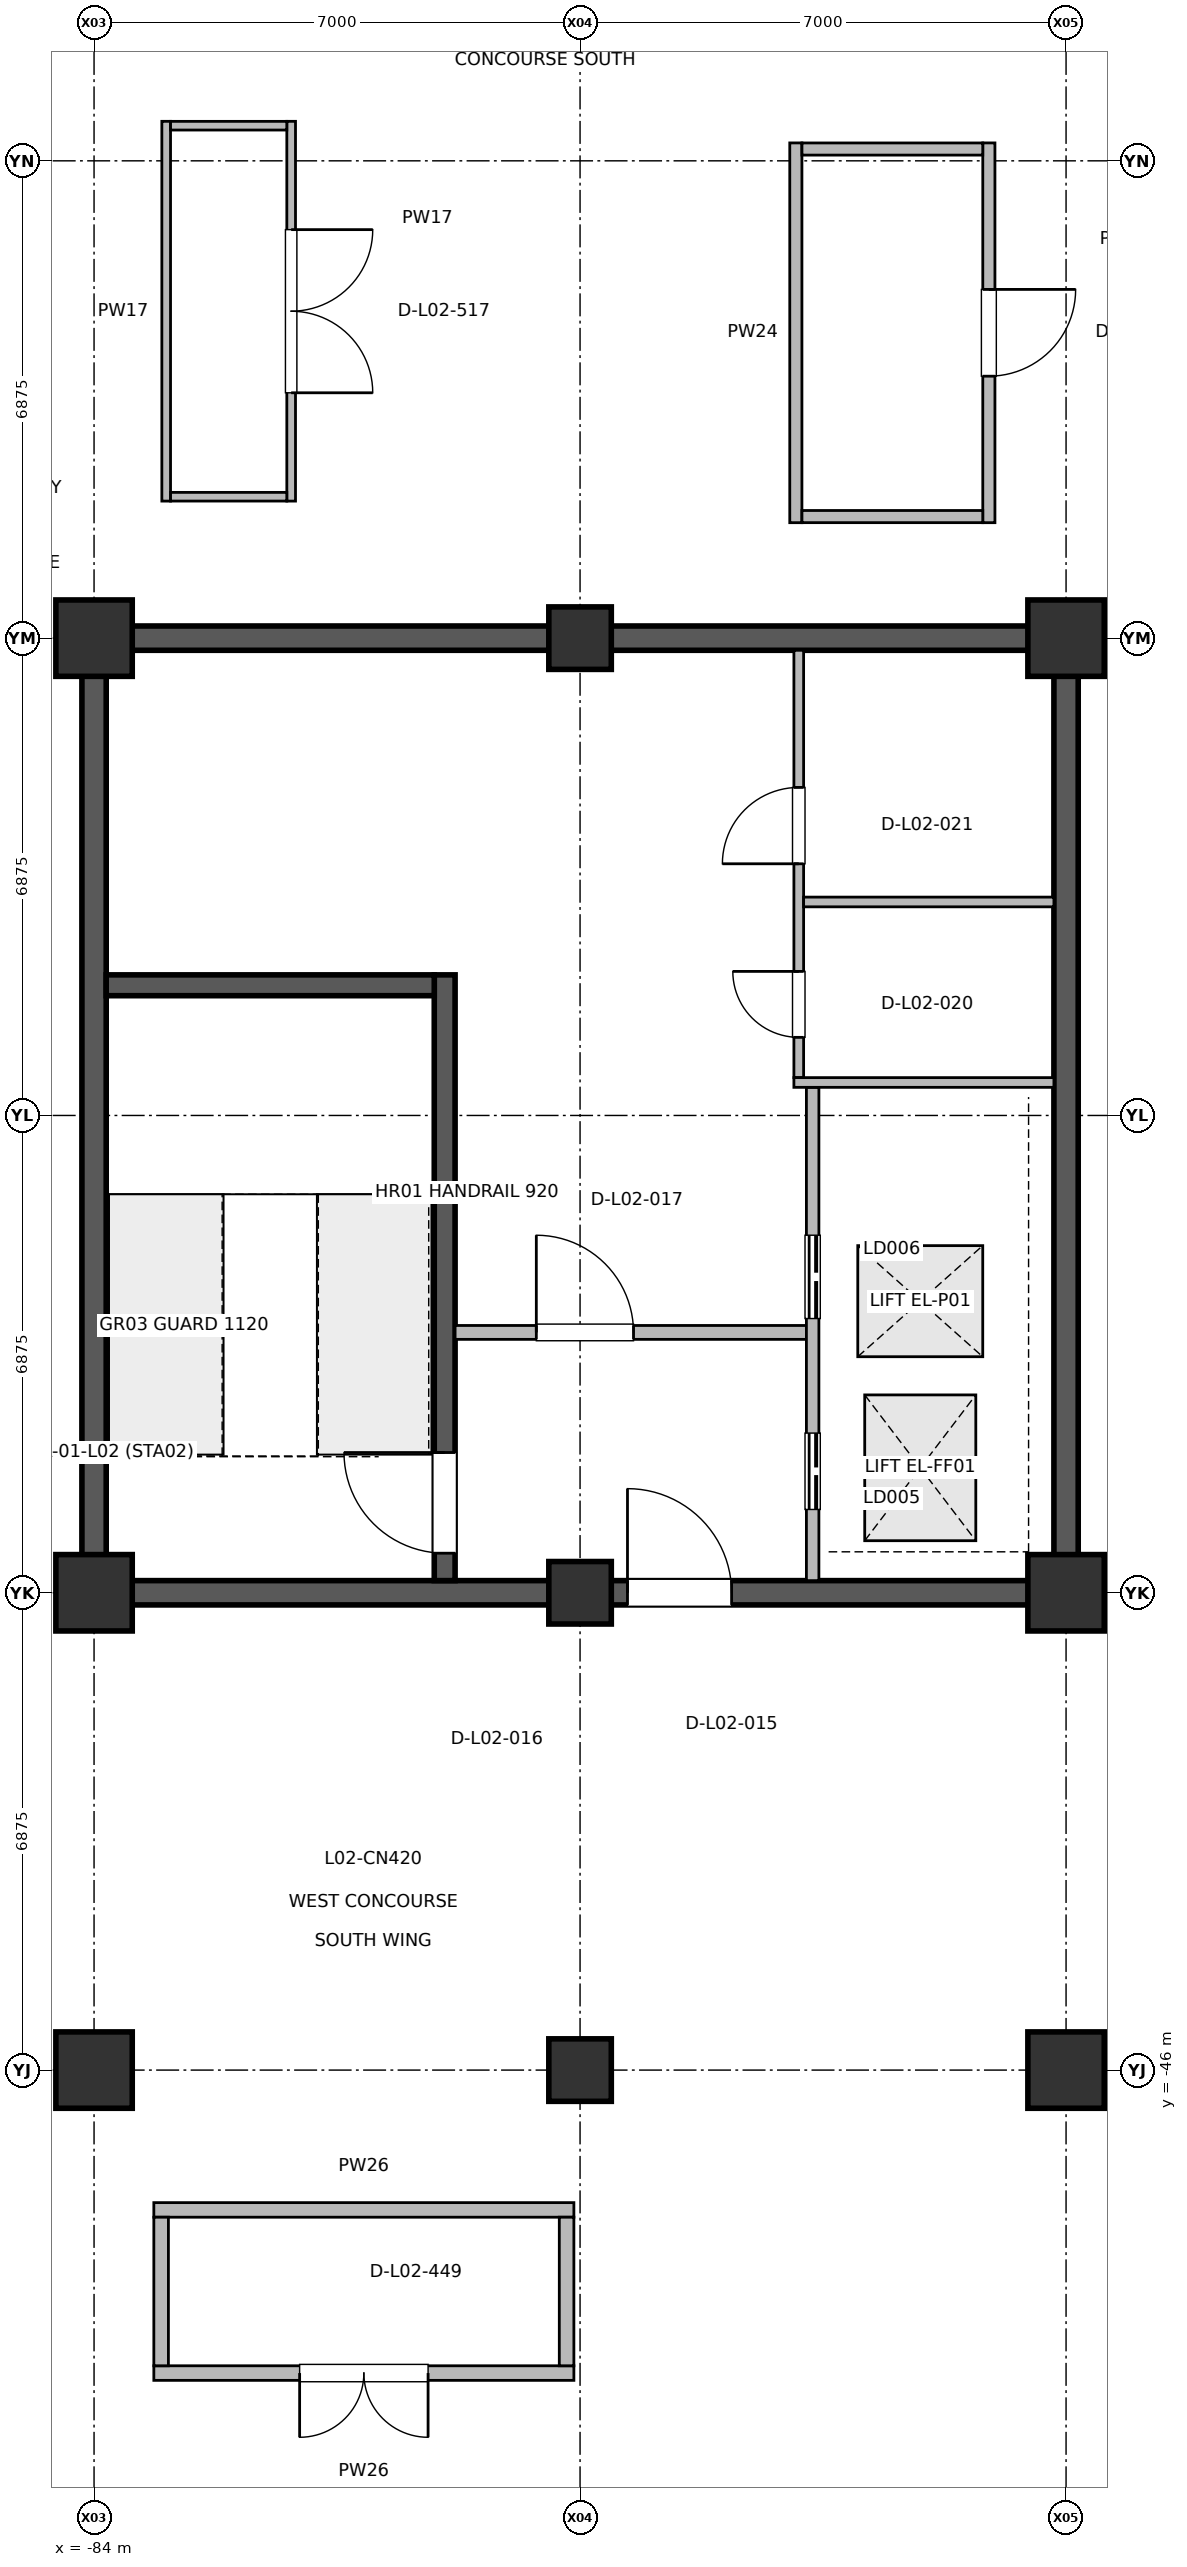
"""IFC4 building model, lengths in metres.
Left out: names, types, materials, properties, quantities, classifications, styles, units other than length and angle.
Written with IfcOpenShell. Run it as: python <this file> out.ifc"""

import sys

from ifc_helpers import new_model, si_unit, direction, frame, frame_2d, origin, origin_2d, place, context, subcontext, project, spatial, rectangle, extrude, element, fill, save


model = new_model("IFC4")
c1 = context("Model", 3, precision=1e-05, world=origin(), true_north=direction((0.0, 1.0)))
c2 = subcontext(c1, "Body", "Model", "MODEL_VIEW")
j1 = project(units=[si_unit("LENGTHUNIT", "METRE"), si_unit("PLANEANGLEUNIT", "RADIAN")], contexts=[c1])
p1 = place(None, origin())
s1 = spatial("IfcSite", under=j1, at=p1, CompositionType="ELEMENT")
p2 = place(p1, origin())
s2 = spatial("IfcBuilding", under=s1, at=p2, CompositionType="ELEMENT")
p3 = place(p2, frame((0.0, 0.0, 6.0)))
s3 = spatial("IfcBuildingStorey", under=s2, at=p3, CompositionType="ELEMENT", Elevation=6.0)
for number, where, z_axis, x_axis in (
    (1, (-84.0, -46.0, 0.0), (0.0, 0.0, 1.0), (1.0, 0.0, 0.0)),
    (2, (-84.0, -39.125, 0.0), (0.0, 0.0, 1.0), (1.0, 0.0, 0.0)),
    (3, (-84.0, -25.375, 0.0), (0.0, 0.0, 1.0), (1.0, 0.0, 0.0)),
):
    element("IfcColumn", number, at=place(p3, frame(where, z_axis=z_axis, x_axis=x_axis)), inside=s3, PredefinedType="COLUMN", context=c2, shape_type="SweptSolid", body=[
        extrude(rectangle(XDim=1.1, YDim=1.1, at=origin_2d()), origin(), (0.0, 0.0, 1.0), 5.398),
    ])
for number, where, z_axis, x_axis in (
    (4, (-77.0, -46.0, 0.0), (0.0, 0.0, 1.0), (1.0, 0.0, 0.0)),
    (5, (-77.0, -39.125, 0.0), (0.0, 0.0, 1.0), (1.0, 0.0, 0.0)),
    (6, (-77.0, -25.375, 0.0), (0.0, 0.0, 1.0), (1.0, 0.0, 0.0)),
):
    element("IfcColumn", number, at=place(p3, frame(where, z_axis=z_axis, x_axis=x_axis)), inside=s3, PredefinedType="COLUMN", context=c2, shape_type="SweptSolid", body=[
        extrude(rectangle(XDim=0.9, YDim=0.9, at=origin_2d()), origin(), (0.0, 0.0, 1.0), 5.398),
    ])
for number, where, z_axis, x_axis in (
    (7, (-70.0, -46.0, 0.0), (0.0, 0.0, 1.0), (1.0, 0.0, 0.0)),
    (8, (-70.0, -39.125, 0.0), (0.0, 0.0, 1.0), (1.0, 0.0, 0.0)),
    (9, (-70.0, -25.375, 0.0), (0.0, 0.0, 1.0), (1.0, 0.0, 0.0)),
):
    element("IfcColumn", number, at=place(p3, frame(where, z_axis=z_axis, x_axis=x_axis)), inside=s3, PredefinedType="COLUMN", context=c2, shape_type="SweptSolid", body=[
        extrude(rectangle(XDim=1.1, YDim=1.1, at=origin_2d()), origin(), (0.0, 0.0, 1.0), 5.398),
    ])
for number, where, z_axis, x_axis in (
    (10, (-84.0, -38.95, 0.0), (0.0, 0.0, 1.0), (0.0, 1.0, 0.0)),
    (11, (-70.0, -38.95, 0.0), (0.0, 0.0, 1.0), (0.0, 1.0, 0.0)),
):
    element("IfcWall", number, at=place(p3, frame(where, z_axis=z_axis, x_axis=x_axis)), inside=s3, PredefinedType="SHEAR", context=c2, shape_type="SweptSolid", body=[
        extrude(rectangle(XDim=13.4, YDim=0.35, at=frame_2d((6.7, 0.0))), origin(), (0.0, 0.0, 1.0), 5.2),
    ])
p4 = place(p3, frame((-83.825, -39.125, 0.0), z_axis=(0.0, 0.0, 1.0), x_axis=(1.0, 0.0, 0.0)))
e12 = element("IfcWall", 12, at=p4, inside=s3, PredefinedType="SHEAR", context=c2, shape_type="SweptSolid", body=[
    extrude(rectangle(XDim=13.65, YDim=0.35, at=frame_2d((6.825, 0.0))), origin(), (0.0, 0.0, 1.0), 5.2),
])
p5 = place(p4, frame((7.508, 0.0, 0.0)))
e13 = element("IfcOpeningElement", 13, at=p5, cuts=e12, PredefinedType="OPENING", context=c2, shape_type="SweptSolid", body=[
    extrude(rectangle(XDim=1.5, YDim=2.2, at=frame_2d((0.75, 1.1))), frame((0.0, 0.185, 0.0), z_axis=(0.0, -1.0, 0.0), x_axis=(1.0, 0.0, 0.0)), (0.0, 0.0, 1.0), 0.37),
])
p6 = place(p3, frame((-83.825, -25.375, 0.0), z_axis=(0.0, 0.0, 1.0), x_axis=(1.0, 0.0, 0.0)))
e14 = element("IfcWall", 14, at=p6, inside=s3, PredefinedType="SHEAR", context=c2, shape_type="SweptSolid", body=[
    extrude(rectangle(XDim=13.65, YDim=0.35, at=frame_2d((6.825, 0.0))), origin(), (0.0, 0.0, 1.0), 5.2),
])
p7 = place(p3, frame((-78.95, -38.95, 0.0), z_axis=(0.0, 0.0, 1.0), x_axis=(0.0, 1.0, 0.0)))
e15 = element("IfcWall", 15, at=p7, inside=s3, PredefinedType="SHEAR", context=c2, shape_type="SweptSolid", body=[
    extrude(rectangle(XDim=8.725, YDim=0.3, at=frame_2d((4.362, 0.0))), origin(), (0.0, 0.0, 1.0), 5.2),
])
p8 = place(p7, frame((0.395, 0.0, 0.0)))
e16 = element("IfcOpeningElement", 16, at=p8, cuts=e15, PredefinedType="OPENING", context=c2, shape_type="SweptSolid", body=[
    extrude(rectangle(XDim=1.45, YDim=2.2, at=frame_2d((0.725, 1.1))), frame((0.0, 0.16, 0.0), z_axis=(0.0, -1.0, 0.0), x_axis=(1.0, 0.0, 0.0)), (0.0, 0.0, 1.0), 0.32),
])
p9 = place(p3, frame((-78.8, -35.375, 0.0), z_axis=(0.0, 0.0, 1.0), x_axis=(1.0, 0.0, 0.0)))
e17 = element("IfcWall", 17, at=p9, inside=s3, PredefinedType="PARTITIONING", context=c2, shape_type="SweptSolid", body=[
    extrude(rectangle(XDim=5.06, YDim=0.2, at=frame_2d((2.53, 0.0))), origin(), (0.0, 0.0, 1.0), 4.42),
])
p10 = place(p9, frame((1.17, 0.0, 0.0)))
e18 = element("IfcOpeningElement", 18, at=p10, cuts=e17, PredefinedType="OPENING", context=c2, shape_type="SweptSolid", body=[
    extrude(rectangle(XDim=1.4, YDim=2.2, at=frame_2d((0.7, 1.1))), frame((0.0, 0.11, 0.0), z_axis=(0.0, -1.0, 0.0), x_axis=(1.0, 0.0, 0.0)), (0.0, 0.0, 1.0), 0.22),
])
p11 = place(p3, frame((-73.65, -38.95, 0.0), z_axis=(0.0, 0.0, 1.0), x_axis=(0.0, 1.0, 0.0)))
e19 = element("IfcWall", 19, at=p11, inside=s3, PredefinedType="PARTITIONING", context=c2, shape_type="SweptSolid", body=[
    extrude(rectangle(XDim=7.105, YDim=0.18, at=frame_2d((3.552, 0.0))), origin(), (0.0, 0.0, 1.0), 4.42),
])
p12 = place(p11, frame((1.025, 0.0, 0.0)))
e20 = element("IfcOpeningElement", 20, at=p12, cuts=e19, PredefinedType="OPENING", context=c2, shape_type="SweptSolid", body=[
    extrude(rectangle(XDim=1.1, YDim=2.2, at=frame_2d((0.55, 1.1))), frame((0.0, 0.1, 0.0), z_axis=(0.0, -1.0, 0.0), x_axis=(1.0, 0.0, 0.0)), (0.0, 0.0, 1.0), 0.2),
])
p13 = place(p11, frame((3.775, 0.0, 0.0)))
e21 = element("IfcOpeningElement", 21, at=p13, cuts=e19, PredefinedType="OPENING", context=c2, shape_type="SweptSolid", body=[
    extrude(rectangle(XDim=1.2, YDim=2.25, at=frame_2d((0.6, 1.125))), frame((0.0, 0.1, 0.0), z_axis=(0.0, -1.0, 0.0), x_axis=(1.0, 0.0, 0.0)), (0.0, 0.0, 1.0), 0.2),
])
p14 = place(p3, frame((-73.85, -31.705, 0.0), z_axis=(0.0, 0.0, 1.0), x_axis=(0.0, 1.0, 0.0)))
e22 = element("IfcWall", 22, at=p14, inside=s3, PredefinedType="PARTITIONING", context=c2, shape_type="SweptSolid", body=[
    extrude(rectangle(XDim=6.155, YDim=0.14, at=frame_2d((3.078, 0.0))), origin(), (0.0, 0.0, 1.0), 4.42),
])
p15 = place(p14, frame((0.58, 0.0, 0.0)))
e23 = element("IfcOpeningElement", 23, at=p15, cuts=e22, PredefinedType="OPENING", context=c2, shape_type="SweptSolid", body=[
    extrude(rectangle(XDim=0.95, YDim=2.15, at=frame_2d((0.475, 1.075))), frame((0.0, 0.08, 0.0), z_axis=(0.0, -1.0, 0.0), x_axis=(1.0, 0.0, 0.0)), (0.0, 0.0, 1.0), 0.16),
])
p16 = place(p14, frame((3.08, 0.0, 0.0)))
e24 = element("IfcOpeningElement", 24, at=p16, cuts=e22, PredefinedType="OPENING", context=c2, shape_type="SweptSolid", body=[
    extrude(rectangle(XDim=1.1, YDim=2.15, at=frame_2d((0.55, 1.075))), frame((0.0, 0.08, 0.0), z_axis=(0.0, -1.0, 0.0), x_axis=(1.0, 0.0, 0.0)), (0.0, 0.0, 1.0), 0.16),
])
p17 = place(p3, frame((-71.112, -18.242, 0.0), z_axis=(0.0, 0.0, 1.0), x_axis=(0.0, -1.0, 0.0)))
e25 = element("IfcWall", 25, at=p17, inside=s3, PredefinedType="PARTITIONING", context=c2, shape_type="SweptSolid", body=[
    extrude(rectangle(XDim=5.47, YDim=0.175, at=frame_2d((2.735, 0.0))), origin(), (0.0, 0.0, 1.0), 4.42),
])
p18 = place(p17, frame((2.11, 0.0, 0.0)))
e26 = element("IfcOpeningElement", 26, at=p18, cuts=e25, PredefinedType="OPENING", context=c2, shape_type="SweptSolid", body=[
    extrude(rectangle(XDim=1.25, YDim=2.2, at=frame_2d((0.625, 1.1))), frame((0.0, 0.097, 0.0), z_axis=(0.0, -1.0, 0.0), x_axis=(1.0, 0.0, 0.0)), (0.0, 0.0, 1.0), 0.195),
])
p19 = place(p3, frame((-77.089, -50.364, 0.0), z_axis=(0.0, 0.0, 1.0), x_axis=(-1.0, 0.0, 0.0)))
e27 = element("IfcWall", 27, at=p19, inside=s3, PredefinedType="PARTITIONING", context=c2, shape_type="SweptSolid", body=[
    extrude(rectangle(XDim=6.05, YDim=0.21, at=frame_2d((3.025, 0.0))), origin(), (0.0, 0.0, 1.0), 4.42),
])
p20 = place(p19, frame((2.1, 0.0, 0.0)))
e28 = element("IfcOpeningElement", 28, at=p20, cuts=e27, PredefinedType="OPENING", context=c2, shape_type="SweptSolid", body=[
    extrude(rectangle(XDim=1.85, YDim=2.4, at=frame_2d((0.925, 1.2))), frame((0.0, 0.115, 0.0), z_axis=(0.0, -1.0, 0.0), x_axis=(1.0, 0.0, 0.0)), (0.0, 0.0, 1.0), 0.23),
])
p21 = place(p3, frame((-81.161, -17.931, 0.0), z_axis=(0.0, 0.0, 1.0), x_axis=(0.0, -1.0, 0.0)))
e29 = element("IfcWall", 29, at=p21, inside=s3, PredefinedType="PARTITIONING", context=c2, shape_type="SweptSolid", body=[
    extrude(rectangle(XDim=5.47, YDim=0.125, at=frame_2d((2.735, 0.0))), origin(), (0.0, 0.0, 1.0), 4.42),
])
p22 = place(p21, frame((1.56, 0.0, 0.0)))
e30 = element("IfcOpeningElement", 30, at=p22, cuts=e29, PredefinedType="OPENING", context=c2, shape_type="SweptSolid", body=[
    extrude(rectangle(XDim=2.35, YDim=2.5, at=frame_2d((1.175, 1.25))), frame((0.0, 0.073, 0.0), z_axis=(0.0, -1.0, 0.0), x_axis=(1.0, 0.0, 0.0)), (0.0, 0.0, 1.0), 0.145),
])
p23 = place(p3, frame((-73.92, -31.775, 0.0), z_axis=(0.0, 0.0, 1.0), x_axis=(1.0, 0.0, 0.0)))
e31 = element("IfcWall", 31, at=p23, inside=s3, PredefinedType="PARTITIONING", context=c2, shape_type="SweptSolid", body=[
    extrude(rectangle(XDim=3.745, YDim=0.14, at=frame_2d((1.873, 0.0))), origin(), (0.0, 0.0, 1.0), 4.42),
])
p24 = place(p3, frame((-73.78, -29.175, 0.0), z_axis=(0.0, 0.0, 1.0), x_axis=(1.0, 0.0, 0.0)))
e32 = element("IfcWall", 32, at=p24, inside=s3, PredefinedType="PARTITIONING", context=c2, shape_type="SweptSolid", body=[
    extrude(rectangle(XDim=3.605, YDim=0.14, at=frame_2d((1.802, 0.0))), origin(), (0.0, 0.0, 1.0), 4.42),
])
p25 = place(p3, frame((-73.892, -23.712, 0.0), z_axis=(0.0, 0.0, 1.0), x_axis=(0.0, 1.0, 0.0)))
e33 = element("IfcWall", 33, at=p25, inside=s3, PredefinedType="PARTITIONING", context=c2, shape_type="SweptSolid", body=[
    extrude(rectangle(XDim=5.47, YDim=0.175, at=frame_2d((2.735, 0.0))), origin(), (0.0, 0.0, 1.0), 4.42),
])
for number, where, z_axis, x_axis in (
    (34, (-73.804, -23.624, 0.0), (0.0, 0.0, 1.0), (1.0, 0.0, 0.0)),
    (35, (-73.804, -18.33, 0.0), (0.0, 0.0, 1.0), (1.0, 0.0, 0.0)),
):
    element("IfcWall", number, at=place(p3, frame(where, z_axis=z_axis, x_axis=x_axis)), inside=s3, PredefinedType="PARTITIONING", context=c2, shape_type="SweptSolid", body=[
        extrude(rectangle(XDim=2.604, YDim=0.175, at=frame_2d((1.302, 0.0))), origin(), (0.0, 0.0, 1.0), 4.42),
    ])
p26 = place(p3, frame((-83.139, -48.014, 0.0), z_axis=(0.0, 0.0, 1.0), x_axis=(1.0, 0.0, 0.0)))
e36 = element("IfcWall", 36, at=p26, inside=s3, PredefinedType="PARTITIONING", context=c2, shape_type="SweptSolid", body=[
    extrude(rectangle(XDim=6.05, YDim=0.21, at=frame_2d((3.025, 0.0))), origin(), (0.0, 0.0, 1.0), 4.42),
])
for number, where, z_axis, x_axis in (
    (37, (-83.034, -50.259, 0.0), (0.0, 0.0, 1.0), (0.0, 1.0, 0.0)),
    (38, (-77.194, -50.259, 0.0), (0.0, 0.0, 1.0), (0.0, 1.0, 0.0)),
):
    element("IfcWall", number, at=place(p3, frame(where, z_axis=z_axis, x_axis=x_axis)), inside=s3, PredefinedType="PARTITIONING", context=c2, shape_type="SweptSolid", body=[
        extrude(rectangle(XDim=2.14, YDim=0.21, at=frame_2d((1.07, 0.0))), origin(), (0.0, 0.0, 1.0), 4.42),
    ])
p27 = place(p3, frame((-82.961, -23.401, 0.0), z_axis=(0.0, 0.0, 1.0), x_axis=(0.0, 1.0, 0.0)))
e39 = element("IfcWall", 39, at=p27, inside=s3, PredefinedType="PARTITIONING", context=c2, shape_type="SweptSolid", body=[
    extrude(rectangle(XDim=5.47, YDim=0.125, at=frame_2d((2.735, 0.0))), origin(), (0.0, 0.0, 1.0), 4.42),
])
for number, where, z_axis, x_axis in (
    (40, (-82.898, -23.338, 0.0), (0.0, 0.0, 1.0), (1.0, 0.0, 0.0)),
    (41, (-82.898, -17.994, 0.0), (0.0, 0.0, 1.0), (1.0, 0.0, 0.0)),
):
    element("IfcWall", number, at=place(p3, frame(where, z_axis=z_axis, x_axis=x_axis)), inside=s3, PredefinedType="PARTITIONING", context=c2, shape_type="SweptSolid", body=[
        extrude(rectangle(XDim=1.674, YDim=0.125, at=frame_2d((0.837, 0.0))), origin(), (0.0, 0.0, 1.0), 4.42),
    ])
p28 = place(p3, frame((-83.825, -30.375, 0.0), z_axis=(0.0, 0.0, 1.0), x_axis=(1.0, 0.0, 0.0)))
e42 = element("IfcWall", 42, at=p28, inside=s3, PredefinedType="SHEAR", context=c2, shape_type="SweptSolid", body=[
    extrude(rectangle(XDim=4.725, YDim=0.3, at=frame_2d((2.362, 0.0))), origin(), (0.0, 0.0, 1.0), 5.2),
])
p29 = place(p5, origin())
e43 = element("IfcDoor", 43, at=p29, inside=s3, OperationType="SINGLE_SWING_LEFT", PredefinedType="DOOR", context=c2, shape_type="SweptSolid", body=[
    extrude(rectangle(XDim=1.5, YDim=2.2, at=frame_2d((0.75, 1.1))), frame((0.0, 0.025, 0.0), z_axis=(0.0, -1.0, 0.0), x_axis=(1.0, 0.0, 0.0)), (0.0, 0.0, 1.0), 0.05),
])
fill(e13, e43)
p30 = place(p8, origin())
e44 = element("IfcDoor", 44, at=p30, inside=s3, OperationType="SINGLE_SWING_RIGHT", PredefinedType="DOOR", context=c2, shape_type="SweptSolid", body=[
    extrude(rectangle(XDim=1.45, YDim=2.2, at=frame_2d((0.725, 1.1))), frame((0.0, 0.025, 0.0), z_axis=(0.0, -1.0, 0.0), x_axis=(1.0, 0.0, 0.0)), (0.0, 0.0, 1.0), 0.05),
])
fill(e16, e44)
p31 = place(p10, origin())
e45 = element("IfcDoor", 45, at=p31, inside=s3, OperationType="SINGLE_SWING_LEFT", PredefinedType="DOOR", context=c2, shape_type="SweptSolid", body=[
    extrude(rectangle(XDim=1.4, YDim=2.2, at=frame_2d((0.7, 1.1))), frame((0.0, 0.025, 0.0), z_axis=(0.0, -1.0, 0.0), x_axis=(1.0, 0.0, 0.0)), (0.0, 0.0, 1.0), 0.05),
])
fill(e18, e45)
p32 = place(p12, origin())
e46 = element("IfcDoor", 46, at=p32, inside=s3, OperationType="DOUBLE_DOOR_SLIDING", PredefinedType="DOOR", context=c2, shape_type="SweptSolid", body=[
    extrude(rectangle(XDim=1.1, YDim=2.2, at=frame_2d((0.55, 1.1))), frame((0.0, 0.025, 0.0), z_axis=(0.0, -1.0, 0.0), x_axis=(1.0, 0.0, 0.0)), (0.0, 0.0, 1.0), 0.05),
])
fill(e20, e46)
p33 = place(p13, origin())
e47 = element("IfcDoor", 47, at=p33, inside=s3, OperationType="DOUBLE_DOOR_SLIDING", PredefinedType="DOOR", context=c2, shape_type="SweptSolid", body=[
    extrude(rectangle(XDim=1.2, YDim=2.25, at=frame_2d((0.6, 1.125))), frame((0.0, 0.025, 0.0), z_axis=(0.0, -1.0, 0.0), x_axis=(1.0, 0.0, 0.0)), (0.0, 0.0, 1.0), 0.05),
])
fill(e21, e47)
p34 = place(p15, origin())
e48 = element("IfcDoor", 48, at=p34, inside=s3, OperationType="SINGLE_SWING_RIGHT", PredefinedType="DOOR", context=c2, shape_type="SweptSolid", body=[
    extrude(rectangle(XDim=0.95, YDim=2.15, at=frame_2d((0.475, 1.075))), frame((0.0, 0.025, 0.0), z_axis=(0.0, -1.0, 0.0), x_axis=(1.0, 0.0, 0.0)), (0.0, 0.0, 1.0), 0.05),
])
fill(e23, e48)
p35 = place(p16, origin())
e49 = element("IfcDoor", 49, at=p35, inside=s3, OperationType="SINGLE_SWING_LEFT", PredefinedType="DOOR", context=c2, shape_type="SweptSolid", body=[
    extrude(rectangle(XDim=1.1, YDim=2.15, at=frame_2d((0.55, 1.075))), frame((0.0, 0.025, 0.0), z_axis=(0.0, -1.0, 0.0), x_axis=(1.0, 0.0, 0.0)), (0.0, 0.0, 1.0), 0.05),
])
fill(e24, e49)
p36 = place(p18, origin())
e50 = element("IfcDoor", 50, at=p36, inside=s3, OperationType="SINGLE_SWING_LEFT", PredefinedType="DOOR", context=c2, shape_type="SweptSolid", body=[
    extrude(rectangle(XDim=1.25, YDim=2.2, at=frame_2d((0.625, 1.1))), frame((0.0, 0.025, 0.0), z_axis=(0.0, -1.0, 0.0), x_axis=(1.0, 0.0, 0.0)), (0.0, 0.0, 1.0), 0.05),
])
fill(e26, e50)
p37 = place(p20, origin())
e51 = element("IfcDoor", 51, at=p37, inside=s3, OperationType="DOUBLE_DOOR_SINGLE_SWING", PredefinedType="DOOR", context=c2, shape_type="SweptSolid", body=[
    extrude(rectangle(XDim=1.85, YDim=2.4, at=frame_2d((0.925, 1.2))), frame((0.0, 0.025, 0.0), z_axis=(0.0, -1.0, 0.0), x_axis=(1.0, 0.0, 0.0)), (0.0, 0.0, 1.0), 0.05),
])
fill(e28, e51)
p38 = place(p22, origin())
e52 = element("IfcDoor", 52, at=p38, inside=s3, OperationType="DOUBLE_DOOR_SINGLE_SWING", PredefinedType="DOOR", context=c2, shape_type="SweptSolid", body=[
    extrude(rectangle(XDim=2.35, YDim=2.5, at=frame_2d((1.175, 1.25))), frame((0.0, 0.025, 0.0), z_axis=(0.0, -1.0, 0.0), x_axis=(1.0, 0.0, 0.0)), (0.0, 0.0, 1.0), 0.05),
])
fill(e30, e52)
save(model, sys.argv[1])
